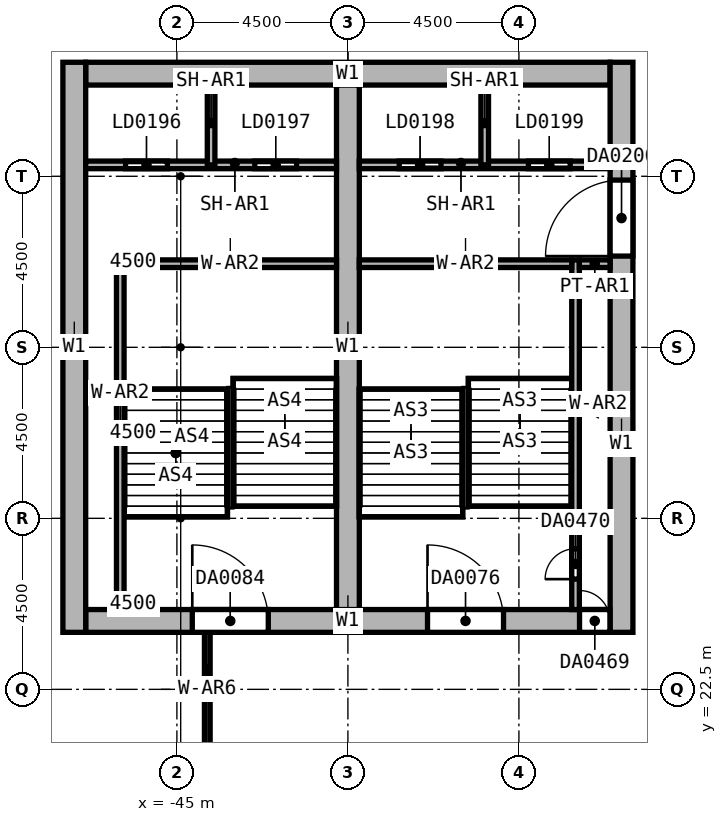
"""IFC4 building model, lengths in metres.
Left out: names, types, materials, properties, quantities, classifications, styles, units other than length and angle.
Written with IfcOpenShell. Run it as: python <this file> out.ifc"""

import sys

from ifc_helpers import new_model, si_unit, direction, frame, frame_2d, origin, place, context, subcontext, project, spatial, rectangle, extrude, element, fill, save


model = new_model("IFC4")
c1 = context("Model", 3, precision=1e-05, world=origin(), true_north=direction((0.0, 1.0)))
c2 = subcontext(c1, "Body", "Model", "MODEL_VIEW")
j1 = project(units=[si_unit("LENGTHUNIT", "METRE"), si_unit("PLANEANGLEUNIT", "RADIAN")], contexts=[c1])
p1 = place(None, origin())
s1 = spatial("IfcSite", under=j1, at=p1, CompositionType="ELEMENT")
p2 = place(p1, origin())
s2 = spatial("IfcBuilding", under=s1, at=p2, CompositionType="ELEMENT")
p3 = place(p2, frame((0.0, 0.0, 52.0)))
s3 = spatial("IfcBuildingStorey", under=s2, at=p3, CompositionType="ELEMENT", Elevation=52.0)
p4 = place(p3, frame((-47.4, 38.7, 0.0), z_axis=(0.0, 0.0, 1.0), x_axis=(1.0, 0.0, 0.0)))
e1 = element("IfcWall", 1, at=p4, inside=s3, PredefinedType="SHEAR", context=c2, shape_type="SweptSolid", body=[
    extrude(rectangle(XDim=13.8, YDim=0.6, at=frame_2d((6.9, 0.0))), origin(), (0.0, 0.0, 1.0), 8.0),
])
p5 = place(p3, frame((-47.4, 24.3, 0.0), z_axis=(0.0, 0.0, 1.0), x_axis=(1.0, 0.0, 0.0)))
e2 = element("IfcWall", 2, at=p5, inside=s3, PredefinedType="SHEAR", context=c2, shape_type="SweptSolid", body=[
    extrude(rectangle(XDim=13.8, YDim=0.6, at=frame_2d((6.9, 0.0))), origin(), (0.0, 0.0, 1.0), 8.0),
])
p6 = place(p5, frame((8.995, 0.0, 0.0)))
e3 = element("IfcOpeningElement", 3, at=p6, cuts=e2, PredefinedType="OPENING", context=c2, shape_type="SweptSolid", body=[
    extrude(rectangle(XDim=2.0, YDim=2.4, at=frame_2d((1.0, 1.2))), frame((0.0, 0.3, 0.0), z_axis=(0.0, -1.0, 0.0), x_axis=(1.0, 0.0, 0.0)), (0.0, 0.0, 1.0), 0.6),
])
p7 = place(p5, frame((2.805, 0.0, 0.0)))
e4 = element("IfcOpeningElement", 4, at=p7, cuts=e2, PredefinedType="OPENING", context=c2, shape_type="SweptSolid", body=[
    extrude(rectangle(XDim=2.0, YDim=2.4, at=frame_2d((1.0, 1.2))), frame((0.0, 0.3, 0.0), z_axis=(0.0, -1.0, 0.0), x_axis=(1.0, 0.0, 0.0)), (0.0, 0.0, 1.0), 0.6),
])
p8 = place(p5, frame((12.995, 0.0, 0.0)))
e5 = element("IfcOpeningElement", 5, at=p8, cuts=e2, PredefinedType="OPENING", context=c2, shape_type="SweptSolid", body=[
    extrude(rectangle(XDim=0.8, YDim=2.1, at=frame_2d((0.4, 1.05))), frame((0.0, 0.3, 0.0), z_axis=(0.0, -1.0, 0.0), x_axis=(1.0, 0.0, 0.0)), (0.0, 0.0, 1.0), 0.6),
])
p9 = place(p3, frame((-47.7, 24.0, 0.0), z_axis=(0.0, 0.0, 1.0), x_axis=(0.0, 1.0, 0.0)))
e6 = element("IfcWall", 6, at=p9, inside=s3, PredefinedType="SHEAR", context=c2, shape_type="SweptSolid", body=[
    extrude(rectangle(XDim=15.0, YDim=0.6, at=frame_2d((7.5, 0.0))), origin(), (0.0, 0.0, 1.0), 8.0),
])
p10 = place(p3, frame((-33.3, 24.0, 0.0), z_axis=(0.0, 0.0, 1.0), x_axis=(0.0, 1.0, 0.0)))
e7 = element("IfcWall", 7, at=p10, inside=s3, PredefinedType="SHEAR", context=c2, shape_type="SweptSolid", body=[
    extrude(rectangle(XDim=15.0, YDim=0.6, at=frame_2d((7.5, 0.0))), origin(), (0.0, 0.0, 1.0), 8.0),
])
p11 = place(p10, frame((9.9, 0.0, 0.0)))
e8 = element("IfcOpeningElement", 8, at=p11, cuts=e7, PredefinedType="OPENING", context=c2, shape_type="SweptSolid", body=[
    extrude(rectangle(XDim=2.0, YDim=2.4, at=frame_2d((1.0, 1.2))), frame((0.0, 0.3, 0.0), z_axis=(0.0, -1.0, 0.0), x_axis=(1.0, 0.0, 0.0)), (0.0, 0.0, 1.0), 0.6),
])
p12 = place(p3, frame((-40.5, 24.6, 0.0), z_axis=(0.0, 0.0, 1.0), x_axis=(0.0, 1.0, 0.0)))
e9 = element("IfcWall", 9, at=p12, inside=s3, PredefinedType="SHEAR", context=c2, shape_type="SweptSolid", body=[
    extrude(rectangle(XDim=13.8, YDim=0.6, at=frame_2d((6.9, 0.0))), origin(), (0.0, 0.0, 1.0), 8.0),
])
p13 = place(p3, frame((-34.51, 24.6, 0.0), z_axis=(0.0, 0.0, 1.0), x_axis=(0.0, 1.0, 0.0)))
e10 = element("IfcWall", 10, at=p13, inside=s3, PredefinedType="SOLIDWALL", context=c2, shape_type="SweptSolid", body=[
    extrude(rectangle(XDim=9.2, YDim=0.2, at=frame_2d((4.6, 0.0))), origin(), (0.0, 0.0, 1.0), 8.0),
])
p14 = place(p13, frame((0.8, 0.0, 0.0)))
e11 = element("IfcOpeningElement", 11, at=p14, cuts=e10, PredefinedType="OPENING", context=c2, shape_type="SweptSolid", body=[
    extrude(rectangle(XDim=0.8, YDim=2.1, at=frame_2d((0.4, 1.05))), frame((0.0, 0.1, 0.0), z_axis=(0.0, -1.0, 0.0), x_axis=(1.0, 0.0, 0.0)), (0.0, 0.0, 1.0), 0.2),
])
p15 = place(p3, frame((-40.2, 33.7, 0.0), z_axis=(0.0, 0.0, 1.0), x_axis=(1.0, 0.0, 0.0)))
e12 = element("IfcWall", 12, at=p15, inside=s3, PredefinedType="SOLIDWALL", context=c2, shape_type="SweptSolid", body=[
    extrude(rectangle(XDim=5.59, YDim=0.2, at=frame_2d((2.795, 0.0))), origin(), (0.0, 0.0, 1.0), 8.0),
])
p16 = place(p3, frame((-46.49, 24.6, 0.0), z_axis=(0.0, 0.0, 1.0), x_axis=(0.0, 1.0, 0.0)))
e13 = element("IfcWall", 13, at=p16, inside=s3, PredefinedType="SOLIDWALL", context=c2, shape_type="SweptSolid", body=[
    extrude(rectangle(XDim=9.2, YDim=0.2, at=frame_2d((4.6, 0.0))), origin(), (0.0, 0.0, 1.0), 8.0),
])
p17 = place(p3, frame((-46.39, 33.7, 0.0), z_axis=(0.0, 0.0, 1.0), x_axis=(1.0, 0.0, 0.0)))
e14 = element("IfcWall", 14, at=p17, inside=s3, PredefinedType="SOLIDWALL", context=c2, shape_type="SweptSolid", body=[
    extrude(rectangle(XDim=5.59, YDim=0.2, at=frame_2d((2.795, 0.0))), origin(), (0.0, 0.0, 1.0), 8.0),
])
p18 = place(p3, frame((-47.4, 36.3, 0.0), z_axis=(0.0, 0.0, 1.0), x_axis=(1.0, 0.0, 0.0)))
e15 = element("IfcWall", 15, at=p18, inside=s3, PredefinedType="SHEAR", context=c2, shape_type="SweptSolid", body=[
    extrude(rectangle(XDim=6.6, YDim=0.2, at=frame_2d((3.3, 0.0))), origin(), (0.0, 0.0, 1.0), 8.0),
])
p19 = place(p18, frame((1.05, 0.0, 0.0)))
e16 = element("IfcOpeningElement", 16, at=p19, cuts=e15, PredefinedType="OPENING", context=c2, shape_type="SweptSolid", body=[
    extrude(rectangle(XDim=1.1, YDim=2.4, at=frame_2d((0.55, 1.2))), frame((0.0, 0.1, 0.0), z_axis=(0.0, -1.0, 0.0), x_axis=(1.0, 0.0, 0.0)), (0.0, 0.0, 1.0), 0.2),
])
p20 = place(p18, frame((4.45, 0.0, 0.0)))
e17 = element("IfcOpeningElement", 17, at=p20, cuts=e15, PredefinedType="OPENING", context=c2, shape_type="SweptSolid", body=[
    extrude(rectangle(XDim=1.1, YDim=2.4, at=frame_2d((0.55, 1.2))), frame((0.0, 0.1, 0.0), z_axis=(0.0, -1.0, 0.0), x_axis=(1.0, 0.0, 0.0)), (0.0, 0.0, 1.0), 0.2),
])
p21 = place(p3, frame((-40.2, 36.3, 0.0), z_axis=(0.0, 0.0, 1.0), x_axis=(1.0, 0.0, 0.0)))
e18 = element("IfcWall", 18, at=p21, inside=s3, PredefinedType="SHEAR", context=c2, shape_type="SweptSolid", body=[
    extrude(rectangle(XDim=6.6, YDim=0.2, at=frame_2d((3.3, 0.0))), origin(), (0.0, 0.0, 1.0), 8.0),
])
p22 = place(p21, frame((1.05, 0.0, 0.0)))
e19 = element("IfcOpeningElement", 19, at=p22, cuts=e18, PredefinedType="OPENING", context=c2, shape_type="SweptSolid", body=[
    extrude(rectangle(XDim=1.1, YDim=2.4, at=frame_2d((0.55, 1.2))), frame((0.0, 0.1, 0.0), z_axis=(0.0, -1.0, 0.0), x_axis=(1.0, 0.0, 0.0)), (0.0, 0.0, 1.0), 0.2),
])
p23 = place(p21, frame((4.45, 0.0, 0.0)))
e20 = element("IfcOpeningElement", 20, at=p23, cuts=e18, PredefinedType="OPENING", context=c2, shape_type="SweptSolid", body=[
    extrude(rectangle(XDim=1.1, YDim=2.4, at=frame_2d((0.55, 1.2))), frame((0.0, 0.1, 0.0), z_axis=(0.0, -1.0, 0.0), x_axis=(1.0, 0.0, 0.0)), (0.0, 0.0, 1.0), 0.2),
])
for number, where, z_axis, x_axis in (
    (21, (-36.9, 36.3, 0.0), (0.0, 0.0, 1.0), (0.0, 1.0, 0.0)),
    (22, (-44.1, 36.3, 0.0), (0.0, 0.0, 1.0), (0.0, 1.0, 0.0)),
):
    element("IfcWall", number, at=place(p3, frame(where, z_axis=z_axis, x_axis=x_axis)), inside=s3, PredefinedType="SHEAR", context=c2, shape_type="SweptSolid", body=[
        extrude(rectangle(XDim=2.1, YDim=0.2, at=frame_2d((1.05, 0.0))), origin(), (0.0, 0.0, 1.0), 8.0),
    ])
p24 = place(p3, frame((-34.41, 33.7, 0.0), z_axis=(0.0, 0.0, 1.0), x_axis=(1.0, 0.0, 0.0)))
e23 = element("IfcWall", 23, at=p24, inside=s3, PredefinedType="PARTITIONING", context=c2, shape_type="SweptSolid", body=[
    extrude(rectangle(XDim=0.81, YDim=0.2, at=frame_2d((0.405, 0.0))), origin(), (0.0, 0.0, 1.0), 8.0),
])
p25 = place(p3, frame((-44.2, 21.0, 0.0), z_axis=(0.0, 0.0, 1.0), x_axis=(0.0, 1.0, 0.0)))
e24 = element("IfcWall", 24, at=p25, inside=s3, PredefinedType="SOLIDWALL", context=c2, shape_type="SweptSolid", body=[
    extrude(rectangle(XDim=3.0, YDim=0.15, at=frame_2d((1.5, 0.0))), origin(), (0.0, 0.0, 1.0), 7.7),
])
p26 = place(p6, origin())
e25 = element("IfcDoor", 25, at=p26, inside=s3, OperationType="DOUBLE_DOOR_SINGLE_SWING", PredefinedType="DOOR", context=c2, shape_type="SweptSolid", body=[
    extrude(rectangle(XDim=2.0, YDim=2.4, at=frame_2d((1.0, 1.2))), frame((0.0, 0.025, 0.0), z_axis=(0.0, -1.0, 0.0), x_axis=(1.0, 0.0, 0.0)), (0.0, 0.0, 1.0), 0.05),
])
fill(e3, e25)
p27 = place(p7, origin())
e26 = element("IfcDoor", 26, at=p27, inside=s3, OperationType="DOUBLE_DOOR_SINGLE_SWING", PredefinedType="DOOR", context=c2, shape_type="SweptSolid", body=[
    extrude(rectangle(XDim=2.0, YDim=2.4, at=frame_2d((1.0, 1.2))), frame((0.0, 0.025, 0.0), z_axis=(0.0, -1.0, 0.0), x_axis=(1.0, 0.0, 0.0)), (0.0, 0.0, 1.0), 0.05),
])
fill(e4, e26)
p28 = place(p19, origin())
e27 = element("IfcDoor", 27, at=p28, inside=s3, OperationType="DOUBLE_DOOR_SLIDING", PredefinedType="DOOR", context=c2, shape_type="SweptSolid", body=[
    extrude(rectangle(XDim=1.1, YDim=2.4, at=frame_2d((0.55, 1.2))), frame((0.0, 0.025, 0.0), z_axis=(0.0, -1.0, 0.0), x_axis=(1.0, 0.0, 0.0)), (0.0, 0.0, 1.0), 0.05),
])
fill(e16, e27)
p29 = place(p20, origin())
e28 = element("IfcDoor", 28, at=p29, inside=s3, OperationType="DOUBLE_DOOR_SLIDING", PredefinedType="DOOR", context=c2, shape_type="SweptSolid", body=[
    extrude(rectangle(XDim=1.1, YDim=2.4, at=frame_2d((0.55, 1.2))), frame((0.0, 0.025, 0.0), z_axis=(0.0, -1.0, 0.0), x_axis=(1.0, 0.0, 0.0)), (0.0, 0.0, 1.0), 0.05),
])
fill(e17, e28)
p30 = place(p22, origin())
e29 = element("IfcDoor", 29, at=p30, inside=s3, OperationType="DOUBLE_DOOR_SLIDING", PredefinedType="DOOR", context=c2, shape_type="SweptSolid", body=[
    extrude(rectangle(XDim=1.1, YDim=2.4, at=frame_2d((0.55, 1.2))), frame((0.0, 0.025, 0.0), z_axis=(0.0, -1.0, 0.0), x_axis=(1.0, 0.0, 0.0)), (0.0, 0.0, 1.0), 0.05),
])
fill(e19, e29)
p31 = place(p23, origin())
e30 = element("IfcDoor", 30, at=p31, inside=s3, OperationType="DOUBLE_DOOR_SLIDING", PredefinedType="DOOR", context=c2, shape_type="SweptSolid", body=[
    extrude(rectangle(XDim=1.1, YDim=2.4, at=frame_2d((0.55, 1.2))), frame((0.0, 0.025, 0.0), z_axis=(0.0, -1.0, 0.0), x_axis=(1.0, 0.0, 0.0)), (0.0, 0.0, 1.0), 0.05),
])
fill(e20, e30)
p32 = place(p11, origin())
e31 = element("IfcDoor", 31, at=p32, inside=s3, OperationType="DOUBLE_DOOR_SINGLE_SWING", PredefinedType="DOOR", context=c2, shape_type="SweptSolid", body=[
    extrude(rectangle(XDim=2.0, YDim=2.4, at=frame_2d((1.0, 1.2))), frame((0.0, 0.025, 0.0), z_axis=(0.0, -1.0, 0.0), x_axis=(1.0, 0.0, 0.0)), (0.0, 0.0, 1.0), 0.05),
])
fill(e8, e31)
p33 = place(p8, origin())
e32 = element("IfcDoor", 32, at=p33, inside=s3, OperationType="SINGLE_SWING_LEFT", PredefinedType="DOOR", context=c2, shape_type="SweptSolid", body=[
    extrude(rectangle(XDim=0.8, YDim=2.1, at=frame_2d((0.4, 1.05))), frame((0.0, 0.025, 0.0), z_axis=(0.0, -1.0, 0.0), x_axis=(1.0, 0.0, 0.0)), (0.0, 0.0, 1.0), 0.05),
])
fill(e5, e32)
p34 = place(p14, origin())
e33 = element("IfcDoor", 33, at=p34, inside=s3, OperationType="SINGLE_SWING_LEFT", PredefinedType="DOOR", context=c2, shape_type="SweptSolid", body=[
    extrude(rectangle(XDim=0.8, YDim=2.1, at=frame_2d((0.4, 1.05))), frame((0.0, 0.025, 0.0), z_axis=(0.0, -1.0, 0.0), x_axis=(1.0, 0.0, 0.0)), (0.0, 0.0, 1.0), 0.05),
])
fill(e11, e33)
save(model, sys.argv[1])
